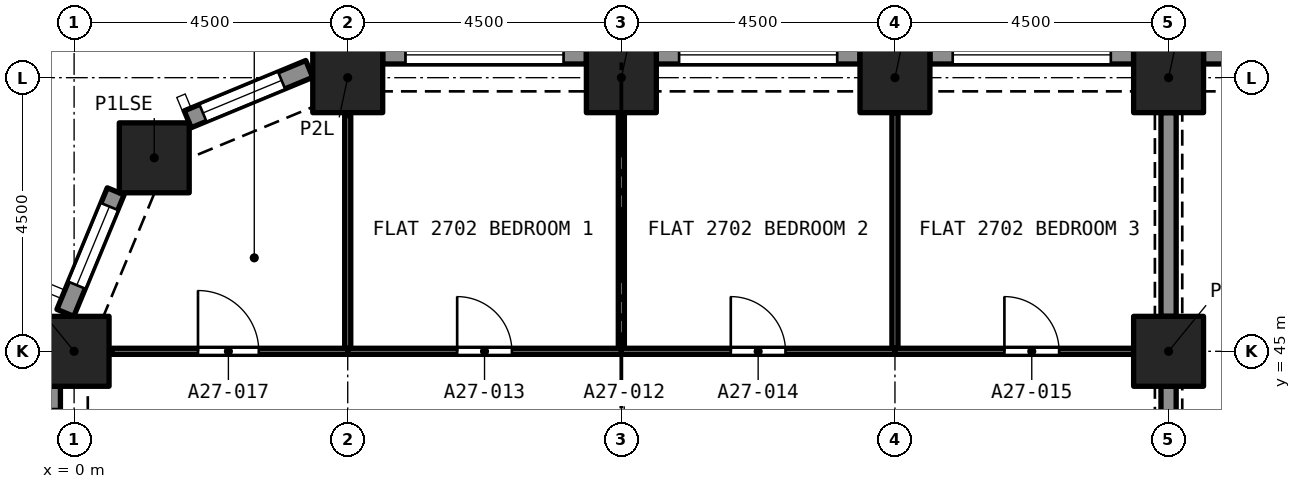
"""IFC4 building model, lengths in metres.
Left out: names, types, materials, properties, quantities, classifications, styles, units other than length and angle.
Written with IfcOpenShell. Run it as: python <this file> out.ifc"""

import sys

from ifc_helpers import new_model, si_unit, direction, frame, frame_2d, origin, origin_2d, place, context, subcontext, project, spatial, rectangle, extrude, element, fill, save


model = new_model("IFC4")
c1 = context("Model", 3, precision=1e-05, world=origin(), true_north=direction((0.0, 1.0)))
c2 = subcontext(c1, "Body", "Model", "MODEL_VIEW")
j1 = project(units=[si_unit("LENGTHUNIT", "METRE"), si_unit("PLANEANGLEUNIT", "RADIAN")], contexts=[c1])
p1 = place(None, origin())
s1 = spatial("IfcSite", under=j1, at=p1, CompositionType="ELEMENT")
p2 = place(p1, origin())
s2 = spatial("IfcBuilding", under=s1, at=p2, CompositionType="ELEMENT")
p3 = place(p2, frame((0.0, 0.0, 99.2)))
s3 = spatial("IfcBuildingStorey", under=s2, at=p3, CompositionType="ELEMENT", Elevation=99.2)
for number, where, z_axis, x_axis in (
    (1, (0.0, 45.0, 0.0), (0.0, 0.0, 1.0), (1.0, 0.0, 0.0)),
    (2, (18.0, 45.0, 0.0), (0.0, 0.0, 1.0), (1.0, 0.0, 0.0)),
    (3, (1.318, 48.182, 0.0), (0.0, 0.0, 1.0), (1.0, 0.0, 0.0)),
    (4, (4.5, 49.5, 0.0), (0.0, 0.0, 1.0), (1.0, 0.0, 0.0)),
    (5, (9.0, 49.5, 0.0), (0.0, 0.0, 1.0), (1.0, 0.0, 0.0)),
    (6, (13.5, 49.5, 0.0), (0.0, 0.0, 1.0), (1.0, 0.0, 0.0)),
    (7, (18.0, 49.5, 0.0), (0.0, 0.0, 1.0), (1.0, 0.0, 0.0)),
):
    element("IfcColumn", number, at=place(p3, frame(where, z_axis=z_axis, x_axis=x_axis)), inside=s3, PredefinedType="COLUMN", context=c2, shape_type="SweptSolid", body=[
        extrude(rectangle(XDim=1.15, YDim=1.15, at=origin_2d()), origin(), (0.0, 0.0, 1.0), 3.2),
    ])
p4 = place(p3, frame((18.575, 49.875, 0.0), z_axis=(0.0, 0.0, 1.0), x_axis=(1.0, 0.0, 0.0)))
e8 = element("IfcWall", 8, at=p4, inside=s3, PredefinedType="SOLIDWALL", context=c2, shape_type="SweptSolid", body=[
    extrude(rectangle(XDim=3.35, YDim=0.3, at=frame_2d((1.675, 0.0))), origin(), (0.0, 0.0, 1.0), 3.2),
])
p5 = place(p4, frame((0.375, 0.0, 0.45)))
e9 = element("IfcOpeningElement", 9, at=p5, cuts=e8, PredefinedType="OPENING", context=c2, shape_type="SweptSolid", body=[
    extrude(rectangle(XDim=2.6, YDim=1.95, at=frame_2d((1.3, 0.975))), frame((0.0, 0.16, 0.0), z_axis=(0.0, -1.0, 0.0), x_axis=(1.0, 0.0, 0.0)), (0.0, 0.0, 1.0), 0.32),
])
p6 = place(p3, frame((14.075, 49.875, 0.0), z_axis=(0.0, 0.0, 1.0), x_axis=(1.0, 0.0, 0.0)))
e10 = element("IfcWall", 10, at=p6, inside=s3, PredefinedType="SOLIDWALL", context=c2, shape_type="SweptSolid", body=[
    extrude(rectangle(XDim=3.35, YDim=0.3, at=frame_2d((1.675, 0.0))), origin(), (0.0, 0.0, 1.0), 3.2),
])
p7 = place(p6, frame((0.375, 0.0, 0.45)))
e11 = element("IfcOpeningElement", 11, at=p7, cuts=e10, PredefinedType="OPENING", context=c2, shape_type="SweptSolid", body=[
    extrude(rectangle(XDim=2.6, YDim=1.95, at=frame_2d((1.3, 0.975))), frame((0.0, 0.16, 0.0), z_axis=(0.0, -1.0, 0.0), x_axis=(1.0, 0.0, 0.0)), (0.0, 0.0, 1.0), 0.32),
])
p8 = place(p3, frame((9.575, 49.875, 0.0), z_axis=(0.0, 0.0, 1.0), x_axis=(1.0, 0.0, 0.0)))
e12 = element("IfcWall", 12, at=p8, inside=s3, PredefinedType="SOLIDWALL", context=c2, shape_type="SweptSolid", body=[
    extrude(rectangle(XDim=3.35, YDim=0.3, at=frame_2d((1.675, 0.0))), origin(), (0.0, 0.0, 1.0), 3.2),
])
p9 = place(p8, frame((0.375, 0.0, 0.45)))
e13 = element("IfcOpeningElement", 13, at=p9, cuts=e12, PredefinedType="OPENING", context=c2, shape_type="SweptSolid", body=[
    extrude(rectangle(XDim=2.6, YDim=1.95, at=frame_2d((1.3, 0.975))), frame((0.0, 0.16, 0.0), z_axis=(0.0, -1.0, 0.0), x_axis=(1.0, 0.0, 0.0)), (0.0, 0.0, 1.0), 0.32),
])
p10 = place(p3, frame((5.075, 49.875, 0.0), z_axis=(0.0, 0.0, 1.0), x_axis=(1.0, 0.0, 0.0)))
e14 = element("IfcWall", 14, at=p10, inside=s3, PredefinedType="SOLIDWALL", context=c2, shape_type="SweptSolid", body=[
    extrude(rectangle(XDim=3.35, YDim=0.3, at=frame_2d((1.675, 0.0))), origin(), (0.0, 0.0, 1.0), 3.2),
])
p11 = place(p10, frame((0.375, 0.0, 0.45)))
e15 = element("IfcOpeningElement", 15, at=p11, cuts=e14, PredefinedType="OPENING", context=c2, shape_type="SweptSolid", body=[
    extrude(rectangle(XDim=2.6, YDim=1.95, at=frame_2d((1.3, 0.975))), frame((0.0, 0.16, 0.0), z_axis=(0.0, -1.0, 0.0), x_axis=(1.0, 0.0, 0.0)), (0.0, 0.0, 1.0), 0.32),
])
p12 = place(p3, frame((1.869, 48.816, 0.0), z_axis=(0.0, 0.0, 1.0), x_axis=(0.923862802911, 0.382723818695, 0.0)))
e16 = element("IfcWall", 16, at=p12, inside=s3, PredefinedType="SOLIDWALL", context=c2, shape_type="SweptSolid", body=[
    extrude(rectangle(XDim=2.164, YDim=0.3, at=frame_2d((1.082, 0.0))), origin(), (0.0, 0.0, 1.0), 3.2),
])
p13 = place(p12, frame((0.271, 0.0, 0.45)))
e17 = element("IfcOpeningElement", 17, at=p13, cuts=e16, PredefinedType="OPENING", context=c2, shape_type="SweptSolid", body=[
    extrude(rectangle(XDim=1.4, YDim=1.95, at=frame_2d((0.7, 0.975))), frame((0.0, 0.16, 0.0), z_axis=(0.0, -1.0, 0.0), x_axis=(1.0, 0.0, 0.0)), (0.0, 0.0, 1.0), 0.32),
])
p14 = place(p3, frame((-0.144, 45.632, 0.0), z_axis=(0.0, 0.0, 1.0), x_axis=(0.382723818695, 0.923862802911, 0.0)))
e18 = element("IfcWall", 18, at=p14, inside=s3, PredefinedType="SOLIDWALL", context=c2, shape_type="SweptSolid", body=[
    extrude(rectangle(XDim=2.164, YDim=0.3, at=frame_2d((1.082, 0.0))), origin(), (0.0, 0.0, 1.0), 3.2),
])
p15 = place(p14, frame((0.493, 0.0, 0.45)))
e19 = element("IfcOpeningElement", 19, at=p15, cuts=e18, PredefinedType="OPENING", context=c2, shape_type="SweptSolid", body=[
    extrude(rectangle(XDim=1.4, YDim=1.95, at=frame_2d((0.7, 0.975))), frame((0.0, 0.16, 0.0), z_axis=(0.0, -1.0, 0.0), x_axis=(1.0, 0.0, 0.0)), (0.0, 0.0, 1.0), 0.32),
])
p16 = place(p3, frame((-0.375, 41.075, 0.0), z_axis=(0.0, 0.0, 1.0), x_axis=(0.0, 1.0, 0.0)))
e20 = element("IfcWall", 20, at=p16, inside=s3, PredefinedType="SOLIDWALL", context=c2, shape_type="SweptSolid", body=[
    extrude(rectangle(XDim=3.35, YDim=0.3, at=frame_2d((1.675, 0.0))), origin(), (0.0, 0.0, 1.0), 3.2),
])
p17 = place(p16, frame((0.375, 0.0, 0.45)))
e21 = element("IfcOpeningElement", 21, at=p17, cuts=e20, PredefinedType="OPENING", context=c2, shape_type="SweptSolid", body=[
    extrude(rectangle(XDim=2.6, YDim=1.95, at=frame_2d((1.3, 0.975))), frame((0.0, 0.16, 0.0), z_axis=(0.0, -1.0, 0.0), x_axis=(1.0, 0.0, 0.0)), (0.0, 0.0, 1.0), 0.32),
])
p18 = place(p3, frame((9.0, 45.05, 0.0), z_axis=(0.0, 0.0, 1.0), x_axis=(0.0, 1.0, 0.0)))
e22 = element("IfcWall", 22, at=p18, inside=s3, PredefinedType="PARTITIONING", context=c2, shape_type="SweptSolid", body=[
    extrude(rectangle(XDim=3.875, YDim=0.1, at=frame_2d((1.938, 0.0))), origin(), (0.0, 0.0, 1.0), 2.9),
])
p19 = place(p3, frame((4.5, 45.0, 0.0), z_axis=(0.0, 0.0, 1.0), x_axis=(1.0, 0.0, 0.0)))
e23 = element("IfcWall", 23, at=p19, inside=s3, PredefinedType="PARTITIONING", context=c2, shape_type="SweptSolid", body=[
    extrude(rectangle(XDim=4.5, YDim=0.1, at=frame_2d((2.25, 0.0))), origin(), (0.0, 0.0, 1.0), 2.9),
])
p20 = place(p19, frame((1.8, 0.0, 0.0)))
e24 = element("IfcOpeningElement", 24, at=p20, cuts=e23, PredefinedType="OPENING", context=c2, shape_type="SweptSolid", body=[
    extrude(rectangle(XDim=0.9, YDim=2.1, at=frame_2d((0.45, 1.05))), frame((0.0, 0.06, 0.0), z_axis=(0.0, -1.0, 0.0), x_axis=(1.0, 0.0, 0.0)), (0.0, 0.0, 1.0), 0.12),
])
p21 = place(p3, frame((4.5, 45.05, 0.0), z_axis=(0.0, 0.0, 1.0), x_axis=(0.0, 1.0, 0.0)))
e25 = element("IfcWall", 25, at=p21, inside=s3, PredefinedType="PARTITIONING", context=c2, shape_type="SweptSolid", body=[
    extrude(rectangle(XDim=3.828, YDim=0.1, at=frame_2d((1.914, 0.0))), origin(), (0.0, 0.0, 1.0), 2.9),
])
p22 = place(p3, frame((13.5, 45.05, 0.0), z_axis=(0.0, 0.0, 1.0), x_axis=(0.0, 1.0, 0.0)))
e26 = element("IfcWall", 26, at=p22, inside=s3, PredefinedType="PARTITIONING", context=c2, shape_type="SweptSolid", body=[
    extrude(rectangle(XDim=3.875, YDim=0.1, at=frame_2d((1.938, 0.0))), origin(), (0.0, 0.0, 1.0), 2.9),
])
p23 = place(p3, frame((9.0, 45.0, 0.0), z_axis=(0.0, 0.0, 1.0), x_axis=(1.0, 0.0, 0.0)))
e27 = element("IfcWall", 27, at=p23, inside=s3, PredefinedType="PARTITIONING", context=c2, shape_type="SweptSolid", body=[
    extrude(rectangle(XDim=4.5, YDim=0.1, at=frame_2d((2.25, 0.0))), origin(), (0.0, 0.0, 1.0), 2.9),
])
p24 = place(p23, frame((1.8, 0.0, 0.0)))
e28 = element("IfcOpeningElement", 28, at=p24, cuts=e27, PredefinedType="OPENING", context=c2, shape_type="SweptSolid", body=[
    extrude(rectangle(XDim=0.9, YDim=2.1, at=frame_2d((0.45, 1.05))), frame((0.0, 0.06, 0.0), z_axis=(0.0, -1.0, 0.0), x_axis=(1.0, 0.0, 0.0)), (0.0, 0.0, 1.0), 0.12),
])
p25 = place(p3, frame((13.5, 45.0, 0.0), z_axis=(0.0, 0.0, 1.0), x_axis=(1.0, 0.0, 0.0)))
e29 = element("IfcWall", 29, at=p25, inside=s3, PredefinedType="PARTITIONING", context=c2, shape_type="SweptSolid", body=[
    extrude(rectangle(XDim=3.925, YDim=0.1, at=frame_2d((1.962, 0.0))), origin(), (0.0, 0.0, 1.0), 2.9),
])
p26 = place(p25, frame((1.8, 0.0, 0.0)))
e30 = element("IfcOpeningElement", 30, at=p26, cuts=e29, PredefinedType="OPENING", context=c2, shape_type="SweptSolid", body=[
    extrude(rectangle(XDim=0.9, YDim=2.1, at=frame_2d((0.45, 1.05))), frame((0.0, 0.06, 0.0), z_axis=(0.0, -1.0, 0.0), x_axis=(1.0, 0.0, 0.0)), (0.0, 0.0, 1.0), 0.12),
])
p27 = place(p3, frame((18.0, 45.575, 0.0), z_axis=(0.0, 0.0, 1.0), x_axis=(0.0, 1.0, 0.0)))
e31 = element("IfcWall", 31, at=p27, inside=s3, PredefinedType="PARTITIONING", context=c2, shape_type="SweptSolid", body=[
    extrude(rectangle(XDim=3.35, YDim=0.25, at=frame_2d((1.675, 0.0))), origin(), (0.0, 0.0, 1.0), 2.38),
])
p28 = place(p3, frame((0.622, 45.0, 0.0), z_axis=(0.0, 0.0, 1.0), x_axis=(1.0, 0.0, 0.0)))
e32 = element("IfcWall", 32, at=p28, inside=s3, PredefinedType="PARTITIONING", context=c2, shape_type="SweptSolid", body=[
    extrude(rectangle(XDim=3.878, YDim=0.1, at=frame_2d((1.939, 0.0))), origin(), (0.0, 0.0, 1.0), 2.9),
])
p29 = place(p28, frame((1.415, 0.0, 0.0)))
e33 = element("IfcOpeningElement", 33, at=p29, cuts=e32, PredefinedType="OPENING", context=c2, shape_type="SweptSolid", body=[
    extrude(rectangle(XDim=1.0, YDim=2.1, at=frame_2d((0.5, 1.05))), frame((0.0, 0.06, 0.0), z_axis=(0.0, -1.0, 0.0), x_axis=(1.0, 0.0, 0.0)), (0.0, 0.0, 1.0), 0.12),
])
p30 = place(p3, frame((18.0, 41.075, 0.0), z_axis=(0.0, 0.0, 1.0), x_axis=(0.0, 1.0, 0.0)))
e34 = element("IfcWall", 34, at=p30, inside=s3, PredefinedType="PARTITIONING", context=c2, shape_type="SweptSolid", body=[
    extrude(rectangle(XDim=3.35, YDim=0.25, at=frame_2d((1.675, 0.0))), origin(), (0.0, 0.0, 1.0), 2.38),
])
p31 = place(p7, origin())
e35 = element("IfcWindow", 35, at=p31, inside=s3, PartitioningType="SINGLE_PANEL", PredefinedType="WINDOW", context=c2, shape_type="SweptSolid", body=[
    extrude(rectangle(XDim=2.6, YDim=1.95, at=frame_2d((1.3, 0.975))), frame((0.0, 0.03, 0.0), z_axis=(0.0, -1.0, 0.0), x_axis=(1.0, 0.0, 0.0)), (0.0, 0.0, 1.0), 0.06),
])
fill(e11, e35)
p32 = place(p9, origin())
e36 = element("IfcWindow", 36, at=p32, inside=s3, PartitioningType="SINGLE_PANEL", PredefinedType="WINDOW", context=c2, shape_type="SweptSolid", body=[
    extrude(rectangle(XDim=2.6, YDim=1.95, at=frame_2d((1.3, 0.975))), frame((0.0, 0.03, 0.0), z_axis=(0.0, -1.0, 0.0), x_axis=(1.0, 0.0, 0.0)), (0.0, 0.0, 1.0), 0.06),
])
fill(e13, e36)
p33 = place(p11, origin())
e37 = element("IfcWindow", 37, at=p33, inside=s3, PartitioningType="SINGLE_PANEL", PredefinedType="WINDOW", context=c2, shape_type="SweptSolid", body=[
    extrude(rectangle(XDim=2.6, YDim=1.95, at=frame_2d((1.3, 0.975))), frame((0.0, 0.03, 0.0), z_axis=(0.0, -1.0, 0.0), x_axis=(1.0, 0.0, 0.0)), (0.0, 0.0, 1.0), 0.06),
])
fill(e15, e37)
p34 = place(p13, origin())
e38 = element("IfcWindow", 38, at=p34, inside=s3, PartitioningType="SINGLE_PANEL", PredefinedType="WINDOW", context=c2, shape_type="SweptSolid", body=[
    extrude(rectangle(XDim=1.4, YDim=1.95, at=frame_2d((0.7, 0.975))), frame((0.0, 0.03, 0.0), z_axis=(0.0, -1.0, 0.0), x_axis=(1.0, 0.0, 0.0)), (0.0, 0.0, 1.0), 0.06),
])
fill(e17, e38)
p35 = place(p15, origin())
e39 = element("IfcWindow", 39, at=p35, inside=s3, PartitioningType="SINGLE_PANEL", PredefinedType="WINDOW", context=c2, shape_type="SweptSolid", body=[
    extrude(rectangle(XDim=1.4, YDim=1.95, at=frame_2d((0.7, 0.975))), frame((0.0, 0.03, 0.0), z_axis=(0.0, -1.0, 0.0), x_axis=(1.0, 0.0, 0.0)), (0.0, 0.0, 1.0), 0.06),
])
fill(e19, e39)
p36 = place(p20, origin())
e40 = element("IfcDoor", 40, at=p36, inside=s3, OperationType="SINGLE_SWING_RIGHT", PredefinedType="DOOR", context=c2, shape_type="SweptSolid", body=[
    extrude(rectangle(XDim=0.9, YDim=2.1, at=frame_2d((0.45, 1.05))), frame((0.0, 0.025, 0.0), z_axis=(0.0, -1.0, 0.0), x_axis=(1.0, 0.0, 0.0)), (0.0, 0.0, 1.0), 0.05),
])
fill(e24, e40)
p37 = place(p24, origin())
e41 = element("IfcDoor", 41, at=p37, inside=s3, OperationType="SINGLE_SWING_LEFT", PredefinedType="DOOR", context=c2, shape_type="SweptSolid", body=[
    extrude(rectangle(XDim=0.9, YDim=2.1, at=frame_2d((0.45, 1.05))), frame((0.0, 0.025, 0.0), z_axis=(0.0, -1.0, 0.0), x_axis=(1.0, 0.0, 0.0)), (0.0, 0.0, 1.0), 0.05),
])
fill(e28, e41)
p38 = place(p26, origin())
e42 = element("IfcDoor", 42, at=p38, inside=s3, OperationType="SINGLE_SWING_RIGHT", PredefinedType="DOOR", context=c2, shape_type="SweptSolid", body=[
    extrude(rectangle(XDim=0.9, YDim=2.1, at=frame_2d((0.45, 1.05))), frame((0.0, 0.025, 0.0), z_axis=(0.0, -1.0, 0.0), x_axis=(1.0, 0.0, 0.0)), (0.0, 0.0, 1.0), 0.05),
])
fill(e30, e42)
p39 = place(p29, origin())
e43 = element("IfcDoor", 43, at=p39, inside=s3, OperationType="SINGLE_SWING_LEFT", PredefinedType="DOOR", context=c2, shape_type="SweptSolid", body=[
    extrude(rectangle(XDim=1.0, YDim=2.1, at=frame_2d((0.5, 1.05))), frame((0.0, 0.025, 0.0), z_axis=(0.0, -1.0, 0.0), x_axis=(1.0, 0.0, 0.0)), (0.0, 0.0, 1.0), 0.05),
])
fill(e33, e43)
save(model, sys.argv[1])
